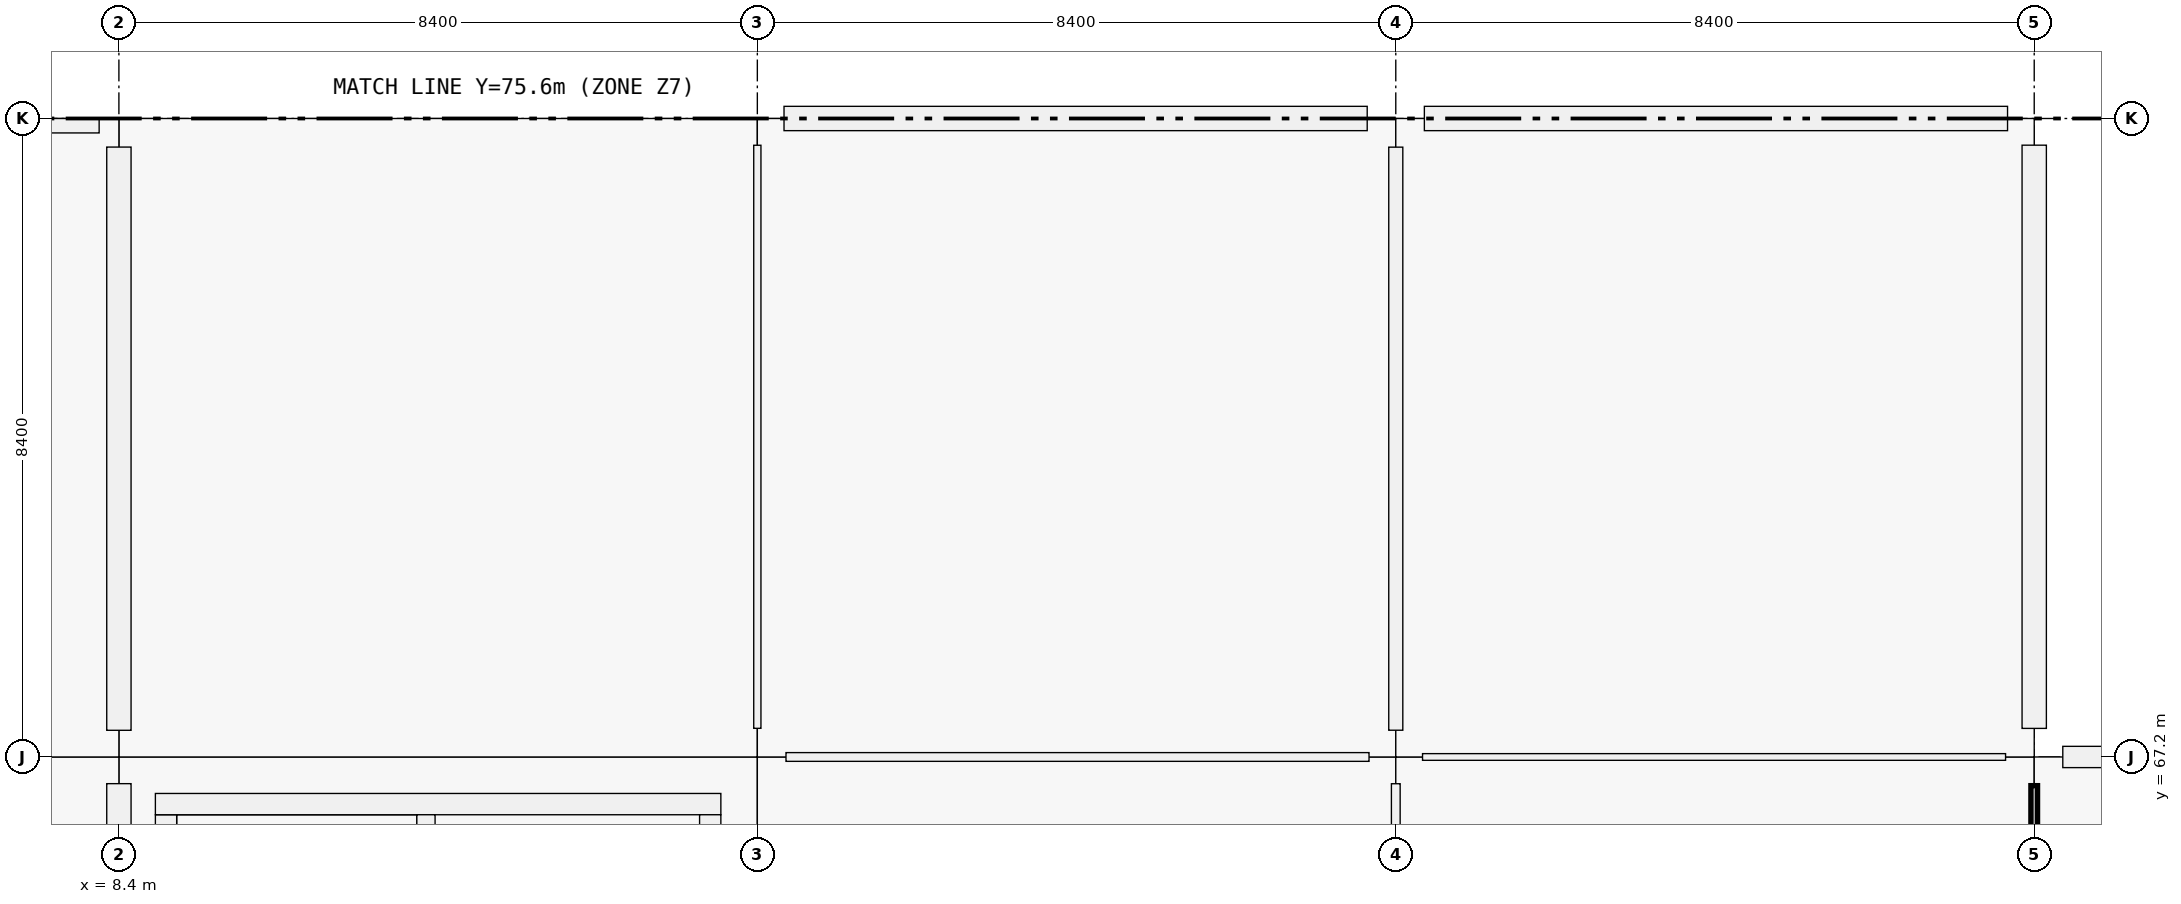
"""IFC4 building model, lengths in metres.
Left out: names, types, materials, properties, quantities, classifications, styles, units other than length and angle.
Written with IfcOpenShell. Run it as: python <this file> out.ifc"""

import sys

from ifc_helpers import new_model, si_unit, direction, frame, frame_2d, origin, origin_2d, place, context, subcontext, project, spatial, rectangle, extrude, element, fill, save


model = new_model("IFC4")
c1 = context("Model", 3, precision=1e-05, world=origin(), true_north=direction((0.0, 1.0)))
c2 = subcontext(c1, "Body", "Model", "MODEL_VIEW")
j1 = project(units=[si_unit("LENGTHUNIT", "METRE"), si_unit("PLANEANGLEUNIT", "RADIAN")], contexts=[c1])
p1 = place(None, origin())
s1 = spatial("IfcSite", under=j1, at=p1, CompositionType="ELEMENT")
p2 = place(p1, origin())
s2 = spatial("IfcBuilding", under=s1, at=p2, CompositionType="ELEMENT")
p3 = place(p2, frame((0.0, 0.0, 10.26)))
s3 = spatial("IfcBuildingStorey", under=s2, at=p3, CompositionType="ELEMENT", Elevation=10.26)
p4 = place(p3, frame((8.4, 67.2, 0.0), z_axis=(0.0, 0.0, 1.0), x_axis=(1.0, 0.0, 0.0)))
e1 = element("IfcColumn", 1, at=p4, inside=s3, PredefinedType="COLUMN", context=c2, shape_type="SweptSolid", body=[
    extrude(rectangle(XDim=0.7, YDim=0.7, at=origin_2d()), origin(), (0.0, 0.0, 1.0), 4.5),
])
for number, where, z_axis, x_axis in (
    (2, (8.4, 75.6, 0.0), (0.0, 0.0, 1.0), (1.0, 0.0, 0.0)),
    (3, (16.8, 67.2, 0.0), (0.0, 0.0, 1.0), (1.0, 0.0, 0.0)),
):
    element("IfcColumn", number, at=place(p3, frame(where, z_axis=z_axis, x_axis=x_axis)), inside=s3, PredefinedType="COLUMN", context=c2, shape_type="SweptSolid", body=[
        extrude(rectangle(XDim=0.75, YDim=0.75, at=origin_2d()), origin(), (0.0, 0.0, 1.0), 4.5),
    ])
for number, where, z_axis, x_axis in (
    (4, (16.8, 75.6, 0.0), (0.0, 0.0, 1.0), (1.0, 0.0, 0.0)),
    (5, (25.2, 67.2, 0.0), (0.0, 0.0, 1.0), (1.0, 0.0, 0.0)),
):
    element("IfcColumn", number, at=place(p3, frame(where, z_axis=z_axis, x_axis=x_axis)), inside=s3, PredefinedType="COLUMN", context=c2, shape_type="SweptSolid", body=[
        extrude(rectangle(XDim=0.7, YDim=0.7, at=origin_2d()), origin(), (0.0, 0.0, 1.0), 4.5),
    ])
for number, where, z_axis, x_axis in (
    (6, (25.2, 75.6, 0.0), (0.0, 0.0, 1.0), (1.0, 0.0, 0.0)),
    (7, (33.6, 67.2, 0.0), (0.0, 0.0, 1.0), (1.0, 0.0, 0.0)),
):
    element("IfcColumn", number, at=place(p3, frame(where, z_axis=z_axis, x_axis=x_axis)), inside=s3, PredefinedType="COLUMN", context=c2, shape_type="SweptSolid", body=[
        extrude(rectangle(XDim=0.75, YDim=0.75, at=origin_2d()), origin(), (0.0, 0.0, 1.0), 4.5),
    ])
p5 = place(p3, frame((33.6, 75.6, 0.0), z_axis=(0.0, 0.0, 1.0), x_axis=(1.0, 0.0, 0.0)))
e8 = element("IfcColumn", 8, at=p5, inside=s3, PredefinedType="COLUMN", context=c2, shape_type="SweptSolid", body=[
    extrude(rectangle(XDim=0.7, YDim=0.7, at=origin_2d()), origin(), (0.0, 0.0, 1.0), 4.5),
])
p6 = place(p3, frame((8.4, 59.176, 0.0), z_axis=(0.0, 0.0, 1.0), x_axis=(0.0, 1.0, 0.0)))
e9 = element("IfcWall", 9, at=p6, inside=s3, PredefinedType="SOLIDWALL", context=c2, shape_type="SweptSolid", body=[
    extrude(rectangle(XDim=7.673, YDim=0.32, at=frame_2d((3.836, 0.0))), origin(), (0.0, 0.0, 1.0), 3.54),
])
p7 = place(p3, frame((8.4, 67.551, 0.0), z_axis=(0.0, 0.0, 1.0), x_axis=(0.0, 1.0, 0.0)))
e10 = element("IfcWall", 10, at=p7, inside=s3, PredefinedType="SOLIDWALL", context=c2, shape_type="SweptSolid", body=[
    extrude(rectangle(XDim=7.673, YDim=0.32, at=frame_2d((3.836, 0.0))), origin(), (0.0, 0.0, 1.0), 3.54),
])
p8 = place(p7, frame((2.787, 0.0, 0.9)))
e11 = element("IfcOpeningElement", 11, at=p8, cuts=e10, PredefinedType="OPENING", context=c2, shape_type="SweptSolid", body=[
    extrude(rectangle(XDim=2.1, YDim=1.8, at=frame_2d((1.05, 0.9))), frame((0.0, 0.16, 0.0), z_axis=(0.0, -1.0, 0.0), x_axis=(1.0, 0.0, 0.0)), (0.0, 0.0, 1.0), 0.32),
])
p9 = place(p3, frame((17.151, 75.6, 0.0), z_axis=(0.0, 0.0, 1.0), x_axis=(1.0, 0.0, 0.0)))
e12 = element("IfcWall", 12, at=p9, inside=s3, PredefinedType="SOLIDWALL", context=c2, shape_type="SweptSolid", body=[
    extrude(rectangle(XDim=7.673, YDim=0.32, at=frame_2d((3.836, 0.0))), origin(), (0.0, 0.0, 1.0), 3.54),
])
p10 = place(p9, frame((2.636, 0.0, 0.9)))
e13 = element("IfcOpeningElement", 13, at=p10, cuts=e12, PredefinedType="OPENING", context=c2, shape_type="SweptSolid", body=[
    extrude(rectangle(XDim=2.4, YDim=1.8, at=frame_2d((1.2, 0.9))), frame((0.0, 0.16, 0.0), z_axis=(0.0, -1.0, 0.0), x_axis=(1.0, 0.0, 0.0)), (0.0, 0.0, 1.0), 0.32),
])
p11 = place(p3, frame((25.576, 75.6, 0.0), z_axis=(0.0, 0.0, 1.0), x_axis=(1.0, 0.0, 0.0)))
e14 = element("IfcWall", 14, at=p11, inside=s3, PredefinedType="SOLIDWALL", context=c2, shape_type="SweptSolid", body=[
    extrude(rectangle(XDim=7.673, YDim=0.32, at=frame_2d((3.836, 0.0))), origin(), (0.0, 0.0, 1.0), 3.54),
])
p12 = place(p11, frame((2.337, 0.0, 0.9)))
e15 = element("IfcOpeningElement", 15, at=p12, cuts=e14, PredefinedType="OPENING", context=c2, shape_type="SweptSolid", body=[
    extrude(rectangle(XDim=3.0, YDim=1.2, at=frame_2d((1.5, 0.6))), frame((0.0, 0.16, 0.0), z_axis=(0.0, -1.0, 0.0), x_axis=(1.0, 0.0, 0.0)), (0.0, 0.0, 1.0), 0.32),
])
p13 = place(p3, frame((33.6, 75.249, 0.0), z_axis=(0.0, 0.0, 1.0), x_axis=(0.0, -1.0, 0.0)))
e16 = element("IfcWall", 16, at=p13, inside=s3, PredefinedType="SOLIDWALL", context=c2, shape_type="SweptSolid", body=[
    extrude(rectangle(XDim=7.673, YDim=0.32, at=frame_2d((3.836, 0.0))), origin(), (0.0, 0.0, 1.0), 3.54),
])
p14 = place(p13, frame((2.486, 0.0, 0.9)))
e17 = element("IfcOpeningElement", 17, at=p14, cuts=e16, PredefinedType="OPENING", context=c2, shape_type="SweptSolid", body=[
    extrude(rectangle(XDim=2.7, YDim=1.2, at=frame_2d((1.35, 0.6))), frame((0.0, 0.16, 0.0), z_axis=(0.0, -1.0, 0.0), x_axis=(1.0, 0.0, 0.0)), (0.0, 0.0, 1.0), 0.32),
])
p15 = place(p3, frame((33.976, 67.2, 0.0), z_axis=(0.0, 0.0, 1.0), x_axis=(1.0, 0.0, 0.0)))
e18 = element("IfcWall", 18, at=p15, inside=s3, PredefinedType="SOLIDWALL", context=c2, shape_type="SweptSolid", body=[
    extrude(rectangle(XDim=7.673, YDim=0.28, at=frame_2d((3.836, 0.0))), origin(), (0.0, 0.0, 1.0), 3.54),
])
p16 = place(p15, frame((2.937, 0.0, 0.9)))
e19 = element("IfcOpeningElement", 19, at=p16, cuts=e18, PredefinedType="OPENING", context=c2, shape_type="SweptSolid", body=[
    extrude(rectangle(XDim=1.8, YDim=1.35, at=frame_2d((0.9, 0.675))), frame((0.0, 0.14, 0.0), z_axis=(0.0, -1.0, 0.0), x_axis=(1.0, 0.0, 0.0)), (0.0, 0.0, 1.0), 0.28),
])
p17 = place(p3, frame((0.26, 75.505, 0.0), z_axis=(0.0, 0.0, 1.0), x_axis=(1.0, 0.0, 0.0)))
e20 = element("IfcWall", 20, at=p17, inside=s3, PredefinedType="PARAPET", context=c2, shape_type="SweptSolid", body=[
    extrude(rectangle(XDim=7.88, YDim=0.19, at=frame_2d((3.94, 0.0))), origin(), (0.0, 0.0, 1.0), 0.95),
])
p18 = place(p3, frame((9.02, 59.56, 0.0), z_axis=(0.0, 0.0, 1.0), x_axis=(0.0, 1.0, 0.0)))
e21 = element("IfcWall", 21, at=p18, inside=s3, PredefinedType="SHEAR", context=c2, shape_type="SweptSolid", body=[
    extrude(rectangle(XDim=6.88, YDim=0.28, at=frame_2d((3.44, 0.0))), origin(), (0.0, 0.0, 1.0), 4.5),
])
p19 = place(p3, frame((8.88, 66.58, 0.0), z_axis=(0.0, 0.0, 1.0), x_axis=(1.0, 0.0, 0.0)))
e22 = element("IfcWall", 22, at=p19, inside=s3, PredefinedType="SHEAR", context=c2, shape_type="SweptSolid", body=[
    extrude(rectangle(XDim=7.44, YDim=0.28, at=frame_2d((3.72, 0.0))), origin(), (0.0, 0.0, 1.0), 4.5),
])
p20 = place(p3, frame((16.18, 66.44, 0.0), z_axis=(0.0, 0.0, 1.0), x_axis=(0.0, -1.0, 0.0)))
e23 = element("IfcWall", 23, at=p20, inside=s3, PredefinedType="SHEAR", context=c2, shape_type="SweptSolid", body=[
    extrude(rectangle(XDim=6.88, YDim=0.28, at=frame_2d((3.44, 0.0))), origin(), (0.0, 0.0, 1.0), 4.5),
])
p21 = place(p3, frame((12.44, 59.56, 0.0), z_axis=(0.0, 0.0, 1.0), x_axis=(0.0, 1.0, 0.0)))
e24 = element("IfcWall", 24, at=p21, inside=s3, PredefinedType="SHEAR", context=c2, shape_type="SweptSolid", body=[
    extrude(rectangle(XDim=6.88, YDim=0.24, at=frame_2d((3.44, 0.0))), origin(), (0.0, 0.0, 1.0), 4.5),
])
p22 = place(p21, frame((0.12, 0.0, 0.0)))
e25 = element("IfcOpeningElement", 25, at=p22, cuts=e24, PredefinedType="OPENING", context=c2, shape_type="SweptSolid", body=[
    extrude(rectangle(XDim=1.0, YDim=2.15, at=frame_2d((0.5, 1.075))), frame((0.0, 0.12, 0.0), z_axis=(0.0, -1.0, 0.0), x_axis=(1.0, 0.0, 0.0)), (0.0, 0.0, 1.0), 0.24),
])
p23 = place(p3, frame((17.177, 67.2, 0.0), z_axis=(0.0, 0.0, 1.0), x_axis=(1.0, 0.0, 0.0)))
e26 = element("IfcWall", 26, at=p23, inside=s3, PredefinedType="PARTITIONING", context=c2, shape_type="SweptSolid", body=[
    extrude(rectangle(XDim=7.671, YDim=0.115, at=frame_2d((3.835, 0.0))), origin(), (0.0, 0.0, 1.0), 3.37),
])
p24 = place(p23, frame((3.316, 0.0, 0.0)))
e27 = element("IfcOpeningElement", 27, at=p24, cuts=e26, PredefinedType="OPENING", context=c2, shape_type="SweptSolid", body=[
    extrude(rectangle(XDim=1.04, YDim=2.2, at=frame_2d((0.52, 1.1))), frame((0.0, 0.058, 0.0), z_axis=(0.0, -1.0, 0.0), x_axis=(1.0, 0.0, 0.0)), (0.0, 0.0, 1.0), 0.115),
])
p25 = place(p3, frame((25.552, 67.2, 0.0), z_axis=(0.0, 0.0, 1.0), x_axis=(1.0, 0.0, 0.0)))
e28 = element("IfcWall", 28, at=p25, inside=s3, PredefinedType="PARTITIONING", context=c2, shape_type="SweptSolid", body=[
    extrude(rectangle(XDim=7.671, YDim=0.088, at=frame_2d((3.835, 0.0))), origin(), (0.0, 0.0, 1.0), 3.37),
])
p26 = place(p25, frame((3.316, 0.0, 0.0)))
e29 = element("IfcOpeningElement", 29, at=p26, cuts=e28, PredefinedType="OPENING", context=c2, shape_type="SweptSolid", body=[
    extrude(rectangle(XDim=1.04, YDim=2.2, at=frame_2d((0.52, 1.1))), frame((0.0, 0.044, 0.0), z_axis=(0.0, -1.0, 0.0), x_axis=(1.0, 0.0, 0.0)), (0.0, 0.0, 1.0), 0.088),
])
p27 = place(p3, frame((16.8, 67.577, 0.0), z_axis=(0.0, 0.0, 1.0), x_axis=(0.0, 1.0, 0.0)))
e30 = element("IfcWall", 30, at=p27, inside=s3, PredefinedType="PARTITIONING", context=c2, shape_type="SweptSolid", body=[
    extrude(rectangle(XDim=7.671, YDim=0.095, at=frame_2d((3.835, 0.0))), origin(), (0.0, 0.0, 1.0), 3.37),
])
p28 = place(p27, frame((3.311, 0.0, 0.0)))
e31 = element("IfcOpeningElement", 31, at=p28, cuts=e30, PredefinedType="OPENING", context=c2, shape_type="SweptSolid", body=[
    extrude(rectangle(XDim=1.05, YDim=2.12, at=frame_2d((0.525, 1.06))), frame((0.0, 0.047, 0.0), z_axis=(0.0, -1.0, 0.0), x_axis=(1.0, 0.0, 0.0)), (0.0, 0.0, 1.0), 0.095),
])
p29 = place(p3, frame((25.2, 59.177, 0.0), z_axis=(0.0, 0.0, 1.0), x_axis=(0.0, 1.0, 0.0)))
e32 = element("IfcWall", 32, at=p29, inside=s3, PredefinedType="PARTITIONING", context=c2, shape_type="SweptSolid", body=[
    extrude(rectangle(XDim=7.671, YDim=0.115, at=frame_2d((3.835, 0.0))), origin(), (0.0, 0.0, 1.0), 3.37),
])
p30 = place(p29, frame((3.316, 0.0, 0.0)))
e33 = element("IfcOpeningElement", 33, at=p30, cuts=e32, PredefinedType="OPENING", context=c2, shape_type="SweptSolid", body=[
    extrude(rectangle(XDim=1.04, YDim=2.2, at=frame_2d((0.52, 1.1))), frame((0.0, 0.058, 0.0), z_axis=(0.0, -1.0, 0.0), x_axis=(1.0, 0.0, 0.0)), (0.0, 0.0, 1.0), 0.115),
])
p31 = place(p3, frame((25.2, 67.552, 0.0), z_axis=(0.0, 0.0, 1.0), x_axis=(0.0, 1.0, 0.0)))
e34 = element("IfcWall", 34, at=p31, inside=s3, PredefinedType="PARTITIONING", context=c2, shape_type="SweptSolid", body=[
    extrude(rectangle(XDim=7.671, YDim=0.185, at=frame_2d((3.835, 0.0))), origin(), (0.0, 0.0, 1.0), 3.37),
])
p32 = place(p31, frame((3.356, 0.0, 0.0)))
e35 = element("IfcOpeningElement", 35, at=p32, cuts=e34, PredefinedType="OPENING", context=c2, shape_type="SweptSolid", body=[
    extrude(rectangle(XDim=0.96, YDim=2.18, at=frame_2d((0.48, 1.09))), frame((0.0, 0.093, 0.0), z_axis=(0.0, -1.0, 0.0), x_axis=(1.0, 0.0, 0.0)), (0.0, 0.0, 1.0), 0.185),
])
p33 = place(p3, frame((33.6, 59.152, 0.0), z_axis=(0.0, 0.0, 1.0), x_axis=(0.0, 1.0, 0.0)))
e36 = element("IfcWall", 36, at=p33, inside=s3, PredefinedType="PARTITIONING", context=c2, shape_type="SweptSolid", body=[
    extrude(rectangle(XDim=7.671, YDim=0.088, at=frame_2d((3.835, 0.0))), origin(), (0.0, 0.0, 1.0), 3.37),
])
p34 = place(p33, frame((3.365, 0.0, 0.0)))
e37 = element("IfcOpeningElement", 37, at=p34, cuts=e36, PredefinedType="OPENING", context=c2, shape_type="SweptSolid", body=[
    extrude(rectangle(XDim=0.94, YDim=2.15, at=frame_2d((0.47, 1.075))), frame((0.0, 0.044, 0.0), z_axis=(0.0, -1.0, 0.0), x_axis=(1.0, 0.0, 0.0)), (0.0, 0.0, 1.0), 0.088),
])
p35 = place(p8, origin())
e38 = element("IfcWindow", 38, at=p35, inside=s3, PartitioningType="SINGLE_PANEL", PredefinedType="WINDOW", context=c2, shape_type="SweptSolid", body=[
    extrude(rectangle(XDim=2.1, YDim=1.8, at=frame_2d((1.05, 0.9))), frame((0.0, 0.03, 0.0), z_axis=(0.0, -1.0, 0.0), x_axis=(1.0, 0.0, 0.0)), (0.0, 0.0, 1.0), 0.06),
])
fill(e11, e38)
p36 = place(p10, origin())
e39 = element("IfcWindow", 39, at=p36, inside=s3, PartitioningType="SINGLE_PANEL", PredefinedType="WINDOW", context=c2, shape_type="SweptSolid", body=[
    extrude(rectangle(XDim=2.4, YDim=1.8, at=frame_2d((1.2, 0.9))), frame((0.0, 0.03, 0.0), z_axis=(0.0, -1.0, 0.0), x_axis=(1.0, 0.0, 0.0)), (0.0, 0.0, 1.0), 0.06),
])
fill(e13, e39)
p37 = place(p12, origin())
e40 = element("IfcWindow", 40, at=p37, inside=s3, PartitioningType="SINGLE_PANEL", PredefinedType="WINDOW", context=c2, shape_type="SweptSolid", body=[
    extrude(rectangle(XDim=3.0, YDim=1.2, at=frame_2d((1.5, 0.6))), frame((0.0, 0.03, 0.0), z_axis=(0.0, -1.0, 0.0), x_axis=(1.0, 0.0, 0.0)), (0.0, 0.0, 1.0), 0.06),
])
fill(e15, e40)
p38 = place(p14, origin())
e41 = element("IfcWindow", 41, at=p38, inside=s3, PartitioningType="SINGLE_PANEL", PredefinedType="WINDOW", context=c2, shape_type="SweptSolid", body=[
    extrude(rectangle(XDim=2.7, YDim=1.2, at=frame_2d((1.35, 0.6))), frame((0.0, 0.03, 0.0), z_axis=(0.0, -1.0, 0.0), x_axis=(1.0, 0.0, 0.0)), (0.0, 0.0, 1.0), 0.06),
])
fill(e17, e41)
p39 = place(p24, origin())
e42 = element("IfcDoor", 42, at=p39, inside=s3, OperationType="SINGLE_SWING_LEFT", PredefinedType="DOOR", context=c2, shape_type="SweptSolid", body=[
    extrude(rectangle(XDim=1.04, YDim=2.2, at=frame_2d((0.52, 1.1))), frame((0.0, 0.025, 0.0), z_axis=(0.0, -1.0, 0.0), x_axis=(1.0, 0.0, 0.0)), (0.0, 0.0, 1.0), 0.05),
])
fill(e27, e42)
p40 = place(p26, origin())
e43 = element("IfcDoor", 43, at=p40, inside=s3, OperationType="SINGLE_SWING_RIGHT", PredefinedType="DOOR", context=c2, shape_type="SweptSolid", body=[
    extrude(rectangle(XDim=1.04, YDim=2.2, at=frame_2d((0.52, 1.1))), frame((0.0, 0.025, 0.0), z_axis=(0.0, -1.0, 0.0), x_axis=(1.0, 0.0, 0.0)), (0.0, 0.0, 1.0), 0.05),
])
fill(e29, e43)
p41 = place(p28, origin())
e44 = element("IfcDoor", 44, at=p41, inside=s3, OperationType="SINGLE_SWING_LEFT", PredefinedType="DOOR", context=c2, shape_type="SweptSolid", body=[
    extrude(rectangle(XDim=1.05, YDim=2.12, at=frame_2d((0.525, 1.06))), frame((0.0, 0.025, 0.0), z_axis=(0.0, -1.0, 0.0), x_axis=(1.0, 0.0, 0.0)), (0.0, 0.0, 1.0), 0.05),
])
fill(e31, e44)
p42 = place(p32, origin())
e45 = element("IfcDoor", 45, at=p42, inside=s3, OperationType="SINGLE_SWING_RIGHT", PredefinedType="DOOR", context=c2, shape_type="SweptSolid", body=[
    extrude(rectangle(XDim=0.96, YDim=2.18, at=frame_2d((0.48, 1.09))), frame((0.0, 0.025, 0.0), z_axis=(0.0, -1.0, 0.0), x_axis=(1.0, 0.0, 0.0)), (0.0, 0.0, 1.0), 0.05),
])
fill(e35, e45)
save(model, sys.argv[1])
